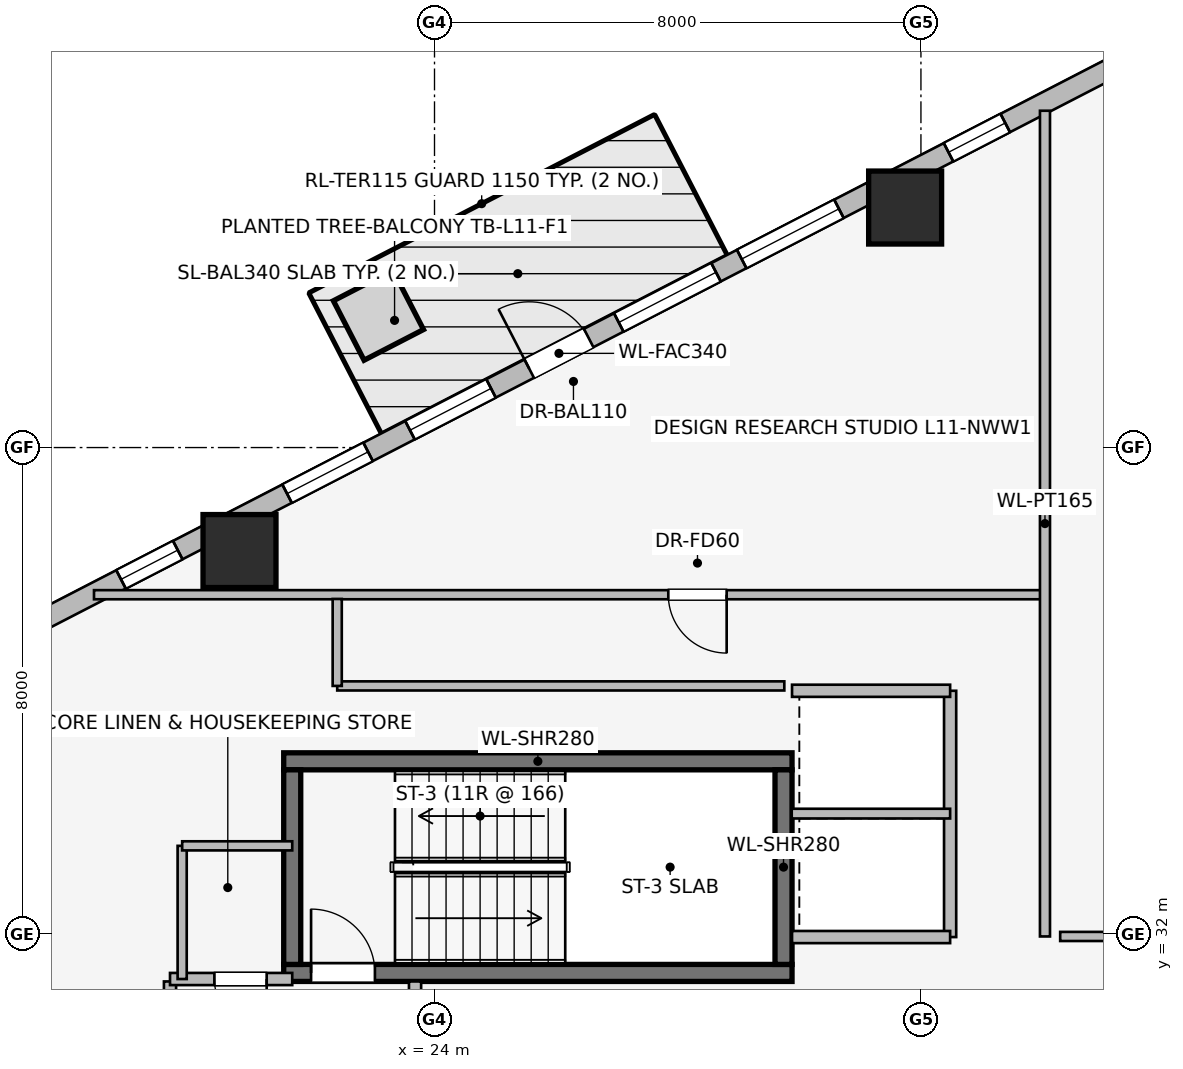
"""IFC4 building model, lengths in metres.
Left out: names, types, materials, properties, quantities, classifications, styles, units other than length and angle.
Written with IfcOpenShell. Run it as: python <this file> out.ifc"""

import sys

from ifc_helpers import new_model, si_unit, direction, frame, frame_2d, origin, origin_2d, place, context, subcontext, project, spatial, rectangle, extrude, element, fill, save


model = new_model("IFC4")
c1 = context("Model", 3, precision=1e-05, world=origin(), true_north=direction((0.0, 1.0)))
c2 = subcontext(c1, "Body", "Model", "MODEL_VIEW")
j1 = project(units=[si_unit("LENGTHUNIT", "METRE"), si_unit("PLANEANGLEUNIT", "RADIAN")], contexts=[c1])
p1 = place(None, origin())
s1 = spatial("IfcSite", under=j1, at=p1, CompositionType="ELEMENT")
p2 = place(p1, origin())
s2 = spatial("IfcBuilding", under=s1, at=p2, CompositionType="ELEMENT")
p3 = place(p2, frame((0.0, 0.0, 45.25)))
s3 = spatial("IfcBuildingStorey", under=s2, at=p3, CompositionType="ELEMENT", Elevation=45.25)
p4 = place(p3, frame((21.52, 31.36, 0.0), z_axis=(0.0, 0.0, 1.0), x_axis=(1.0, 0.0, 0.0)))
e1 = element("IfcWall", 1, at=p4, inside=s3, PredefinedType="SHEAR", context=c2, shape_type="SweptSolid", body=[
    extrude(rectangle(XDim=8.36, YDim=0.28, at=frame_2d((4.18, 0.0))), origin(), (0.0, 0.0, 1.0), 3.65),
])
p5 = place(p4, frame((0.45, 0.0, 0.0)))
e2 = element("IfcOpeningElement", 2, at=p5, cuts=e1, PredefinedType="OPENING", context=c2, shape_type="SweptSolid", body=[
    extrude(rectangle(XDim=1.05, YDim=2.0, at=frame_2d((0.525, 1.0))), frame((0.0, 0.15, 0.0), z_axis=(0.0, -1.0, 0.0), x_axis=(1.0, 0.0, 0.0)), (0.0, 0.0, 1.0), 0.3),
])
p6 = place(p3, frame((29.88, 34.84, 0.0), z_axis=(0.0, 0.0, 1.0), x_axis=(-1.0, 0.0, 0.0)))
e3 = element("IfcWall", 3, at=p6, inside=s3, PredefinedType="SHEAR", context=c2, shape_type="SweptSolid", body=[
    extrude(rectangle(XDim=8.36, YDim=0.28, at=frame_2d((4.18, 0.0))), origin(), (0.0, 0.0, 1.0), 3.65),
])
for number, where, z_axis, x_axis in (
    (4, (21.66, 34.7, 0.0), (0.0, 0.0, 1.0), (0.0, -1.0, 0.0)),
    (5, (29.74, 31.5, 0.0), (0.0, 0.0, 1.0), (0.0, 1.0, 0.0)),
):
    element("IfcWall", number, at=place(p3, frame(where, z_axis=z_axis, x_axis=x_axis)), inside=s3, PredefinedType="SHEAR", context=c2, shape_type="SweptSolid", body=[
        extrude(rectangle(XDim=3.2, YDim=0.28, at=frame_2d((1.6, 0.0))), origin(), (0.0, 0.0, 1.0), 3.65),
    ])
for number, where, z_axis, x_axis in (
    (6, (31.74, 43.947, 0.0), (0.0, 0.0, 1.0), (1.0, 0.0, 0.0)),
    (7, (20.793, 38.298, 0.0), (0.0, 0.0, 1.0), (1.0, 0.0, 0.0)),
):
    element("IfcColumn", number, at=place(p3, frame(where, z_axis=z_axis, x_axis=x_axis)), inside=s3, PredefinedType="COLUMN", context=c2, shape_type="SweptSolid", body=[
        extrude(rectangle(XDim=1.2, YDim=1.2, at=origin_2d()), origin(), (0.0, 0.0, 1.0), 3.65),
    ])
p7 = place(p3, frame((16.924, 36.841, 0.0), z_axis=(0.0, 0.0, 1.0), x_axis=(0.888634413993, 0.458616264721, 0.0)))
e8 = element("IfcWall", 8, at=p7, inside=s3, PredefinedType="STANDARD", context=c2, shape_type="SweptSolid", body=[
    extrude(rectangle(XDim=20.531, YDim=0.34, at=frame_2d((10.266, 0.0))), origin(), (0.0, 0.0, 1.0), 2.684),
])
p8 = place(p7, frame((9.716, 0.0, 0.0)))
e9 = element("IfcOpeningElement", 9, at=p8, cuts=e8, PredefinedType="OPENING", context=c2, shape_type="SweptSolid", body=[
    extrude(rectangle(XDim=1.1, YDim=2.04, at=frame_2d((0.55, 1.02))), frame((0.0, 0.18, 0.0), z_axis=(0.0, -1.0, 0.0), x_axis=(1.0, 0.0, 0.0)), (0.0, 0.0, 1.0), 0.36),
])
p9 = place(p7, frame((2.161, 0.0, 0.75)))
e10 = element("IfcOpeningElement", 10, at=p9, cuts=e8, PredefinedType="OPENING", context=c2, shape_type="SweptSolid", body=[
    extrude(rectangle(XDim=1.05, YDim=1.4, at=frame_2d((0.525, 0.7))), frame((0.0, 0.18, 0.0), z_axis=(0.0, -1.0, 0.0), x_axis=(1.0, 0.0, 0.0)), (0.0, 0.0, 1.0), 0.36),
])
p10 = place(p7, frame((5.234, 0.0, 0.75)))
e11 = element("IfcOpeningElement", 11, at=p10, cuts=e8, PredefinedType="OPENING", context=c2, shape_type="SweptSolid", body=[
    extrude(rectangle(XDim=1.5, YDim=1.5, at=frame_2d((0.75, 0.75))), frame((0.0, 0.18, 0.0), z_axis=(0.0, -1.0, 0.0), x_axis=(1.0, 0.0, 0.0)), (0.0, 0.0, 1.0), 0.36),
])
p11 = place(p7, frame((7.509, 0.0, 0.75)))
e12 = element("IfcOpeningElement", 12, at=p11, cuts=e8, PredefinedType="OPENING", context=c2, shape_type="SweptSolid", body=[
    extrude(rectangle(XDim=1.5, YDim=1.5, at=frame_2d((0.75, 0.75))), frame((0.0, 0.18, 0.0), z_axis=(0.0, -1.0, 0.0), x_axis=(1.0, 0.0, 0.0)), (0.0, 0.0, 1.0), 0.36),
])
p12 = place(p7, frame((11.373, 0.0, 0.75)))
e13 = element("IfcOpeningElement", 13, at=p12, cuts=e8, PredefinedType="OPENING", context=c2, shape_type="SweptSolid", body=[
    extrude(rectangle(XDim=1.8, YDim=1.5, at=frame_2d((0.9, 0.75))), frame((0.0, 0.18, 0.0), z_axis=(0.0, -1.0, 0.0), x_axis=(1.0, 0.0, 0.0)), (0.0, 0.0, 1.0), 0.36),
])
p13 = place(p7, frame((13.648, 0.0, 0.75)))
e14 = element("IfcOpeningElement", 14, at=p13, cuts=e8, PredefinedType="OPENING", context=c2, shape_type="SweptSolid", body=[
    extrude(rectangle(XDim=1.8, YDim=1.5, at=frame_2d((0.9, 0.75))), frame((0.0, 0.18, 0.0), z_axis=(0.0, -1.0, 0.0), x_axis=(1.0, 0.0, 0.0)), (0.0, 0.0, 1.0), 0.36),
])
p14 = place(p7, frame((17.476, 0.0, 0.75)))
e15 = element("IfcOpeningElement", 15, at=p14, cuts=e8, PredefinedType="OPENING", context=c2, shape_type="SweptSolid", body=[
    extrude(rectangle(XDim=1.05, YDim=1.4, at=frame_2d((0.525, 0.7))), frame((0.0, 0.18, 0.0), z_axis=(0.0, -1.0, 0.0), x_axis=(1.0, 0.0, 0.0)), (0.0, 0.0, 1.0), 0.36),
])
p15 = place(p3, frame((19.65, 25.68, 0.0), z_axis=(0.0, 0.0, 1.0), x_axis=(0.0, 1.0, 0.0)))
e16 = element("IfcWall", 16, at=p15, inside=s3, PredefinedType="PARTITIONING", context=c2, shape_type="SweptSolid", body=[
    extrude(rectangle(XDim=5.54, YDim=0.2, at=frame_2d((2.77, 0.0))), origin(), (0.0, 0.0, 1.0), 3.39),
])
p16 = place(p15, frame((0.62, 0.0, 0.0)))
e17 = element("IfcOpeningElement", 17, at=p16, cuts=e16, PredefinedType="OPENING", context=c2, shape_type="SweptSolid", body=[
    extrude(rectangle(XDim=1.1, YDim=2.2, at=frame_2d((0.55, 1.1))), frame((0.0, 0.11, 0.0), z_axis=(0.0, -1.0, 0.0), x_axis=(1.0, 0.0, 0.0)), (0.0, 0.0, 1.0), 0.22),
])
p17 = place(p15, frame((3.12, 0.0, 0.0)))
e18 = element("IfcOpeningElement", 18, at=p17, cuts=e16, PredefinedType="OPENING", context=c2, shape_type="SweptSolid", body=[
    extrude(rectangle(XDim=1.1, YDim=2.2, at=frame_2d((0.55, 1.1))), frame((0.0, 0.11, 0.0), z_axis=(0.0, -1.0, 0.0), x_axis=(1.0, 0.0, 0.0)), (0.0, 0.0, 1.0), 0.22),
])
p18 = place(p3, frame((23.68, 25.68, 0.0), z_axis=(0.0, 0.0, 1.0), x_axis=(0.0, 1.0, 0.0)))
e19 = element("IfcWall", 19, at=p18, inside=s3, PredefinedType="PARTITIONING", context=c2, shape_type="SweptSolid", body=[
    extrude(rectangle(XDim=5.54, YDim=0.2, at=frame_2d((2.77, 0.0))), origin(), (0.0, 0.0, 1.0), 3.39),
])
p19 = place(p18, frame((1.8, 0.0, 0.0)))
e20 = element("IfcOpeningElement", 20, at=p19, cuts=e19, PredefinedType="OPENING", context=c2, shape_type="SweptSolid", body=[
    extrude(rectangle(XDim=1.05, YDim=2.0, at=frame_2d((0.525, 1.0))), frame((0.0, 0.11, 0.0), z_axis=(0.0, -1.0, 0.0), x_axis=(1.0, 0.0, 0.0)), (0.0, 0.0, 1.0), 0.22),
])
p20 = place(p3, frame((21.66, 31.26, 0.0), z_axis=(0.0, 0.0, 1.0), x_axis=(-1.0, 0.0, 0.0)))
e21 = element("IfcWall", 21, at=p20, inside=s3, PredefinedType="PARTITIONING", context=c2, shape_type="SweptSolid", body=[
    extrude(rectangle(XDim=2.01, YDim=0.2, at=frame_2d((1.005, 0.0))), origin(), (0.0, 0.0, 1.0), 3.39),
])
p21 = place(p20, frame((0.42, 0.0, 0.0)))
e22 = element("IfcOpeningElement", 22, at=p21, cuts=e21, PredefinedType="OPENING", context=c2, shape_type="SweptSolid", body=[
    extrude(rectangle(XDim=0.86, YDim=2.0, at=frame_2d((0.43, 1.0))), frame((0.0, 0.11, 0.0), z_axis=(0.0, -1.0, 0.0), x_axis=(1.0, 0.0, 0.0)), (0.0, 0.0, 1.0), 0.22),
])
p22 = place(p3, frame((32.48, 31.95, 0.0), z_axis=(0.0, 0.0, 1.0), x_axis=(0.0, 1.0, 0.0)))
e23 = element("IfcWall", 23, at=p22, inside=s3, PredefinedType="PARTITIONING", context=c2, shape_type="SweptSolid", body=[
    extrude(rectangle(XDim=4.05, YDim=0.2, at=frame_2d((2.025, 0.0))), origin(), (0.0, 0.0, 1.0), 2.513),
])
for number, where, z_axis, x_axis in (
    (24, (29.88, 36.0, 0.0), (0.0, 0.0, 1.0), (1.0, 0.0, 0.0)),
    (25, (32.48, 31.95, 0.0), (0.0, 0.0, 1.0), (-1.0, 0.0, 0.0)),
):
    element("IfcWall", number, at=place(p3, frame(where, z_axis=z_axis, x_axis=x_axis)), inside=s3, PredefinedType="PARTITIONING", context=c2, shape_type="SweptSolid", body=[
        extrude(rectangle(XDim=2.6, YDim=0.2, at=frame_2d((1.3, 0.0))), origin(), (0.0, 0.0, 1.0), 3.39),
    ])
p23 = place(p3, frame((29.875, 33.98, 0.0), z_axis=(0.0, 0.0, 1.0), x_axis=(1.0, 0.0, 0.0)))
e26 = element("IfcWall", 26, at=p23, inside=s3, PredefinedType="PARTITIONING", context=c2, shape_type="SweptSolid", body=[
    extrude(rectangle(XDim=2.605, YDim=0.16, at=frame_2d((1.302, 0.0))), origin(), (0.0, 0.0, 1.0), 3.39),
])
p24 = place(p3, frame((19.85, 33.45, 0.0), z_axis=(0.0, 0.0, 1.0), x_axis=(0.0, -1.0, 0.0)))
e27 = element("IfcWall", 27, at=p24, inside=s3, PredefinedType="PARTITIONING", context=c2, shape_type="SweptSolid", body=[
    extrude(rectangle(XDim=2.19, YDim=0.15, at=frame_2d((1.095, 0.0))), origin(), (0.0, 0.0, 1.0), 3.39),
])
p25 = place(p3, frame((21.66, 33.45, 0.0), z_axis=(0.0, 0.0, 1.0), x_axis=(-1.0, 0.0, 0.0)))
e28 = element("IfcWall", 28, at=p25, inside=s3, PredefinedType="PARTITIONING", context=c2, shape_type="SweptSolid", body=[
    extrude(rectangle(XDim=1.81, YDim=0.15, at=frame_2d((0.905, 0.0))), origin(), (0.0, 0.0, 1.0), 3.39),
])
p26 = place(p3, frame((34.0, 37.58, 0.0), z_axis=(0.0, 0.0, 1.0), x_axis=(-1.0, 0.0, 0.0)))
e29 = element("IfcWall", 29, at=p26, inside=s3, PredefinedType="PARTITIONING", context=c2, shape_type="SweptSolid", body=[
    extrude(rectangle(XDim=15.6, YDim=0.15, at=frame_2d((7.8, 0.0))), origin(), (0.0, 0.0, 1.0), 3.39),
])
p27 = place(p26, frame((5.195, 0.0, 0.0)))
e30 = element("IfcOpeningElement", 30, at=p27, cuts=e29, PredefinedType="OPENING", context=c2, shape_type="SweptSolid", body=[
    extrude(rectangle(XDim=0.96, YDim=2.0, at=frame_2d((0.48, 1.0))), frame((0.0, 0.085, 0.0), z_axis=(0.0, -1.0, 0.0), x_axis=(1.0, 0.0, 0.0)), (0.0, 0.0, 1.0), 0.17),
])
p28 = place(p3, frame((34.04, 31.96, 0.0), z_axis=(0.0, 0.0, 1.0), x_axis=(0.0, 1.0, 0.0)))
e31 = element("IfcWall", 31, at=p28, inside=s3, PredefinedType="PARTITIONING", context=c2, shape_type="SweptSolid", body=[
    extrude(rectangle(XDim=13.579, YDim=0.165, at=frame_2d((6.79, 0.0))), origin(), (0.0, 0.0, 1.0), 3.39),
])
p29 = place(p3, frame((38.859, 31.96, 0.0), z_axis=(0.0, 0.0, 1.0), x_axis=(-1.0, 0.0, 0.0)))
e32 = element("IfcWall", 32, at=p29, inside=s3, PredefinedType="PARTITIONING", context=c2, shape_type="SweptSolid", body=[
    extrude(rectangle(XDim=4.569, YDim=0.15, at=frame_2d((2.284, 0.0))), origin(), (0.0, 0.0, 1.0), 3.39),
])
p30 = place(p29, frame((1.748, 0.0, 0.0)))
e33 = element("IfcOpeningElement", 33, at=p30, cuts=e32, PredefinedType="OPENING", context=c2, shape_type="SweptSolid", body=[
    extrude(rectangle(XDim=0.96, YDim=2.0, at=frame_2d((0.48, 1.0))), frame((0.0, 0.085, 0.0), z_axis=(0.0, -1.0, 0.0), x_axis=(1.0, 0.0, 0.0)), (0.0, 0.0, 1.0), 0.17),
])
p31 = place(p3, frame((29.753, 36.08, 0.0), z_axis=(0.0, 0.0, 1.0), x_axis=(-1.0, 0.0, 0.0)))
e34 = element("IfcWall", 34, at=p31, inside=s3, PredefinedType="PARTITIONING", context=c2, shape_type="SweptSolid", body=[
    extrude(rectangle(XDim=7.353, YDim=0.15, at=frame_2d((3.677, 0.0))), origin(), (0.0, 0.0, 1.0), 3.39),
])
p32 = place(p3, frame((22.4, 36.08, 0.0), z_axis=(0.0, 0.0, 1.0), x_axis=(0.0, 1.0, 0.0)))
e35 = element("IfcWall", 35, at=p32, inside=s3, PredefinedType="PARTITIONING", context=c2, shape_type="SweptSolid", body=[
    extrude(rectangle(XDim=1.43, YDim=0.15, at=frame_2d((0.715, 0.0))), origin(), (0.0, 0.0, 1.0), 3.39),
])
p33 = place(p8, origin())
e36 = element("IfcDoor", 36, at=p33, inside=s3, OperationType="SINGLE_SWING_LEFT", PredefinedType="DOOR", context=c2, shape_type="SweptSolid", body=[
    extrude(rectangle(XDim=1.1, YDim=2.04, at=frame_2d((0.55, 1.02))), frame((0.0, 0.025, 0.0), z_axis=(0.0, -1.0, 0.0), x_axis=(1.0, 0.0, 0.0)), (0.0, 0.0, 1.0), 0.05),
])
fill(e9, e36)
p34 = place(p9, origin())
e37 = element("IfcWindow", 37, at=p34, inside=s3, PartitioningType="SINGLE_PANEL", PredefinedType="WINDOW", context=c2, shape_type="SweptSolid", body=[
    extrude(rectangle(XDim=1.05, YDim=1.4, at=frame_2d((0.525, 0.7))), frame((0.0, 0.03, 0.0), z_axis=(0.0, -1.0, 0.0), x_axis=(1.0, 0.0, 0.0)), (0.0, 0.0, 1.0), 0.06),
])
fill(e10, e37)
p35 = place(p10, origin())
e38 = element("IfcWindow", 38, at=p35, inside=s3, PartitioningType="SINGLE_PANEL", PredefinedType="WINDOW", context=c2, shape_type="SweptSolid", body=[
    extrude(rectangle(XDim=1.5, YDim=1.5, at=frame_2d((0.75, 0.75))), frame((0.0, 0.03, 0.0), z_axis=(0.0, -1.0, 0.0), x_axis=(1.0, 0.0, 0.0)), (0.0, 0.0, 1.0), 0.06),
])
fill(e11, e38)
p36 = place(p11, origin())
e39 = element("IfcWindow", 39, at=p36, inside=s3, PartitioningType="SINGLE_PANEL", PredefinedType="WINDOW", context=c2, shape_type="SweptSolid", body=[
    extrude(rectangle(XDim=1.5, YDim=1.5, at=frame_2d((0.75, 0.75))), frame((0.0, 0.03, 0.0), z_axis=(0.0, -1.0, 0.0), x_axis=(1.0, 0.0, 0.0)), (0.0, 0.0, 1.0), 0.06),
])
fill(e12, e39)
p37 = place(p12, origin())
e40 = element("IfcWindow", 40, at=p37, inside=s3, PartitioningType="SINGLE_PANEL", PredefinedType="WINDOW", context=c2, shape_type="SweptSolid", body=[
    extrude(rectangle(XDim=1.8, YDim=1.5, at=frame_2d((0.9, 0.75))), frame((0.0, 0.03, 0.0), z_axis=(0.0, -1.0, 0.0), x_axis=(1.0, 0.0, 0.0)), (0.0, 0.0, 1.0), 0.06),
])
fill(e13, e40)
p38 = place(p13, origin())
e41 = element("IfcWindow", 41, at=p38, inside=s3, PartitioningType="SINGLE_PANEL", PredefinedType="WINDOW", context=c2, shape_type="SweptSolid", body=[
    extrude(rectangle(XDim=1.8, YDim=1.5, at=frame_2d((0.9, 0.75))), frame((0.0, 0.03, 0.0), z_axis=(0.0, -1.0, 0.0), x_axis=(1.0, 0.0, 0.0)), (0.0, 0.0, 1.0), 0.06),
])
fill(e14, e41)
p39 = place(p14, origin())
e42 = element("IfcWindow", 42, at=p39, inside=s3, PartitioningType="SINGLE_PANEL", PredefinedType="WINDOW", context=c2, shape_type="SweptSolid", body=[
    extrude(rectangle(XDim=1.05, YDim=1.4, at=frame_2d((0.525, 0.7))), frame((0.0, 0.03, 0.0), z_axis=(0.0, -1.0, 0.0), x_axis=(1.0, 0.0, 0.0)), (0.0, 0.0, 1.0), 0.06),
])
fill(e15, e42)
p40 = place(p5, origin())
e43 = element("IfcDoor", 43, at=p40, inside=s3, OperationType="SINGLE_SWING_LEFT", PredefinedType="DOOR", context=c2, shape_type="SweptSolid", body=[
    extrude(rectangle(XDim=1.05, YDim=2.0, at=frame_2d((0.525, 1.0))), frame((0.0, 0.025, 0.0), z_axis=(0.0, -1.0, 0.0), x_axis=(1.0, 0.0, 0.0)), (0.0, 0.0, 1.0), 0.05),
])
fill(e2, e43)
p41 = place(p21, origin())
e44 = element("IfcDoor", 44, at=p41, inside=s3, OperationType="SINGLE_SWING_LEFT", PredefinedType="DOOR", context=c2, shape_type="SweptSolid", body=[
    extrude(rectangle(XDim=0.86, YDim=2.0, at=frame_2d((0.43, 1.0))), frame((0.0, 0.025, 0.0), z_axis=(0.0, -1.0, 0.0), x_axis=(1.0, 0.0, 0.0)), (0.0, 0.0, 1.0), 0.05),
])
fill(e22, e44)
p42 = place(p27, origin())
e45 = element("IfcDoor", 45, at=p42, inside=s3, OperationType="SINGLE_SWING_LEFT", PredefinedType="DOOR", context=c2, shape_type="SweptSolid", body=[
    extrude(rectangle(XDim=0.96, YDim=2.0, at=frame_2d((0.48, 1.0))), frame((0.0, 0.025, 0.0), z_axis=(0.0, -1.0, 0.0), x_axis=(1.0, 0.0, 0.0)), (0.0, 0.0, 1.0), 0.05),
])
fill(e30, e45)
save(model, sys.argv[1])
